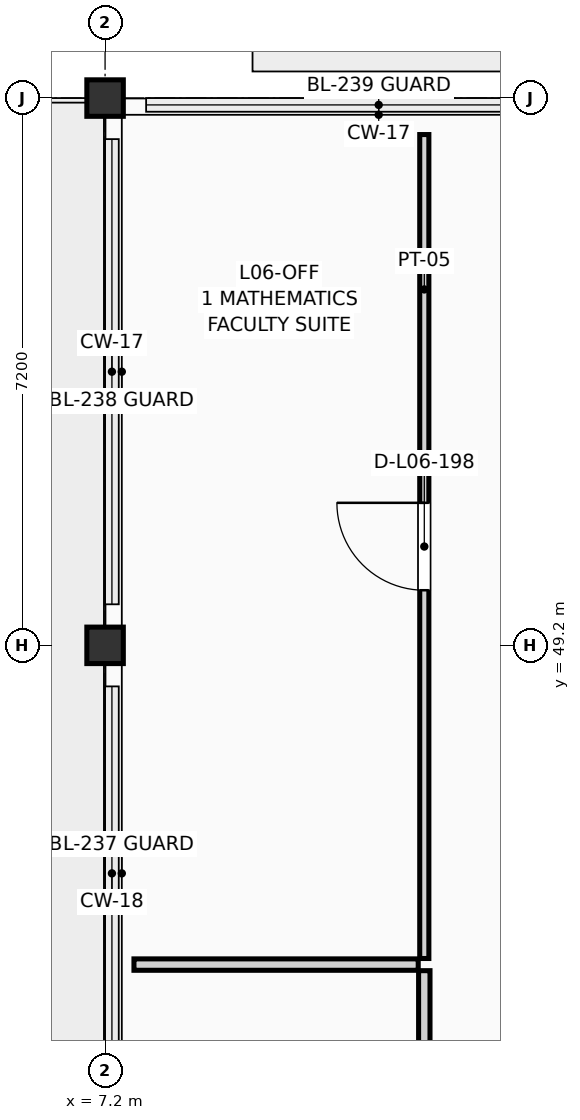
"""IFC4 building model, lengths in metres.
Left out: names, types, materials, properties, quantities, classifications, styles, units other than length and angle.
Written with IfcOpenShell. Run it as: python <this file> out.ifc"""

import sys

from ifc_helpers import new_model, si_unit, direction, frame, frame_2d, origin, origin_2d, place, context, subcontext, project, spatial, rectangle, extrude, element, fill, save


model = new_model("IFC4")
c1 = context("Model", 3, precision=1e-05, world=origin(), true_north=direction((0.0, 1.0)))
c2 = subcontext(c1, "Body", "Model", "MODEL_VIEW")
j1 = project(units=[si_unit("LENGTHUNIT", "METRE"), si_unit("PLANEANGLEUNIT", "RADIAN")], contexts=[c1])
p1 = place(None, origin())
s1 = spatial("IfcSite", under=j1, at=p1, CompositionType="ELEMENT")
p2 = place(p1, origin())
s2 = spatial("IfcBuilding", under=s1, at=p2, CompositionType="ELEMENT")
p3 = place(p2, frame((0.0, 0.0, 22.95)))
s3 = spatial("IfcBuildingStorey", under=s2, at=p3, CompositionType="ELEMENT", Elevation=22.95)
for number, where, z_axis, x_axis in (
    (1, (7.2, 49.2, 0.0), (0.0, 0.0, 1.0), (1.0, 0.0, 0.0)),
    (2, (7.2, 56.4, 0.0), (0.0, 0.0, 1.0), (1.0, 0.0, 0.0)),
):
    element("IfcColumn", number, at=place(p3, frame(where, z_axis=z_axis, x_axis=x_axis)), inside=s3, PredefinedType="COLUMN", context=c2, shape_type="SweptSolid", body=[
        extrude(rectangle(XDim=0.48, YDim=0.48, at=origin_2d()), origin(), (0.0, 0.0, 1.0), 3.3),
    ])
p4 = place(p3, frame((11.4, 34.28, 0.0), z_axis=(0.0, 0.0, 1.0), x_axis=(0.0, 1.0, 0.0)))
e3 = element("IfcWall", 3, at=p4, inside=s3, PredefinedType="PARTITIONING", context=c2, shape_type="SweptSolid", body=[
    extrude(rectangle(XDim=10.64, YDim=0.15, at=frame_2d((5.32, 0.0))), origin(), (0.0, 0.0, 1.0), 3.075),
])
p5 = place(p4, frame((4.61, 0.0, 0.0)))
e4 = element("IfcOpeningElement", 4, at=p5, cuts=e3, PredefinedType="OPENING", context=c2, shape_type="SweptSolid", body=[
    extrude(rectangle(XDim=1.42, YDim=2.22, at=frame_2d((0.71, 1.11))), frame((0.0, 0.087, 0.0), z_axis=(0.0, -1.0, 0.0), x_axis=(1.0, 0.0, 0.0)), (0.0, 0.0, 1.0), 0.174),
])
p6 = place(p3, frame((7.58, 45.0, 0.0), z_axis=(0.0, 0.0, 1.0), x_axis=(1.0, 0.0, 0.0)))
e5 = element("IfcWall", 5, at=p6, inside=s3, PredefinedType="PARTITIONING", context=c2, shape_type="SweptSolid", body=[
    extrude(rectangle(XDim=3.74, YDim=0.15, at=frame_2d((1.87, 0.0))), origin(), (0.0, 0.0, 1.0), 3.075),
])
p7 = place(p3, frame((11.4, 45.08, 0.0), z_axis=(0.0, 0.0, 1.0), x_axis=(0.0, 1.0, 0.0)))
e6 = element("IfcWall", 6, at=p7, inside=s3, PredefinedType="PARTITIONING", context=c2, shape_type="SweptSolid", body=[
    extrude(rectangle(XDim=10.84, YDim=0.12, at=frame_2d((5.42, 0.0))), origin(), (0.0, 0.0, 1.0), 3.075),
])
p8 = place(p7, frame((4.845, 0.0, 0.0)))
e7 = element("IfcOpeningElement", 7, at=p8, cuts=e6, PredefinedType="OPENING", context=c2, shape_type="SweptSolid", body=[
    extrude(rectangle(XDim=1.15, YDim=2.18, at=frame_2d((0.575, 1.09))), frame((0.0, 0.072, 0.0), z_axis=(0.0, -1.0, 0.0), x_axis=(1.0, 0.0, 0.0)), (0.0, 0.0, 1.0), 0.144),
])
p9 = place(p8, origin())
e8 = element("IfcDoor", 8, at=p9, inside=s3, OperationType="SINGLE_SWING_RIGHT", PredefinedType="DOOR", context=c2, shape_type="SweptSolid", body=[
    extrude(rectangle(XDim=1.15, YDim=2.18, at=frame_2d((0.575, 1.09))), frame((0.0, 0.025, 0.0), z_axis=(0.0, -1.0, 0.0), x_axis=(1.0, 0.0, 0.0)), (0.0, 0.0, 1.0), 0.05),
])
fill(e7, e8)
save(model, sys.argv[1])
